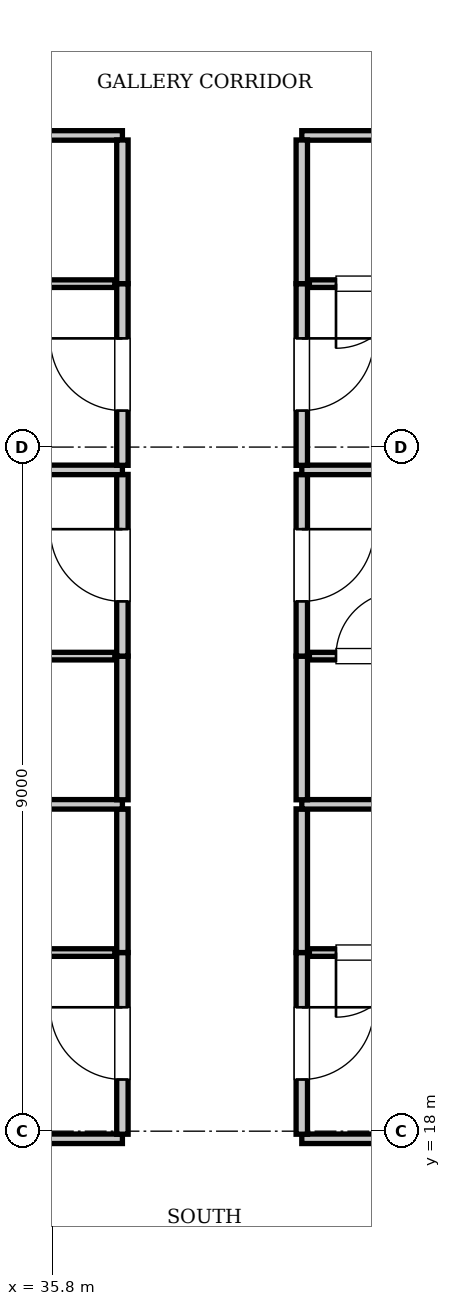
"""IFC4 building model, lengths in metres.
Left out: names, types, materials, properties, quantities, classifications, styles, units other than length and angle.
Written with IfcOpenShell. Run it as: python <this file> out.ifc"""

import sys

from ifc_helpers import new_model, si_unit, direction, frame, frame_2d, origin, place, context, subcontext, project, spatial, rectangle, extrude, element, fill, save


model = new_model("IFC4")
c1 = context("Model", 3, precision=1e-05, world=origin(), true_north=direction((0.0, 1.0)))
c2 = subcontext(c1, "Body", "Model", "MODEL_VIEW")
j1 = project(units=[si_unit("LENGTHUNIT", "METRE"), si_unit("PLANEANGLEUNIT", "RADIAN")], contexts=[c1])
p1 = place(None, origin())
s1 = spatial("IfcSite", under=j1, at=p1, CompositionType="ELEMENT")
p2 = place(p1, origin())
s2 = spatial("IfcBuilding", under=s1, at=p2, CompositionType="ELEMENT")
p3 = place(p2, frame((0.0, 0.0, 212.1)))
s3 = spatial("IfcBuildingStorey", under=s2, at=p3, CompositionType="ELEMENT", Elevation=212.1)
p4 = place(p3, frame((13.2, 17.9, 0.0), z_axis=(0.0, 0.0, 1.0), x_axis=(1.0, 0.0, 0.0)))
e1 = element("IfcWall", 1, at=p4, inside=s3, PredefinedType="PARTITIONING", context=c2, shape_type="SweptSolid", body=[
    extrude(rectangle(XDim=23.52, YDim=0.125, at=frame_2d((11.76, 0.0))), origin(), (0.0, 0.0, 1.0), 3.071),
])
p5 = place(p3, frame((39.08, 17.9, 0.0), z_axis=(0.0, 0.0, 1.0), x_axis=(1.0, 0.0, 0.0)))
e2 = element("IfcWall", 2, at=p5, inside=s3, PredefinedType="PARTITIONING", context=c2, shape_type="SweptSolid", body=[
    extrude(rectangle(XDim=23.32, YDim=0.125, at=frame_2d((11.66, 0.0))), origin(), (0.0, 0.0, 1.0), 3.071),
])
p6 = place(p3, frame((13.2, 31.1, 0.0), z_axis=(0.0, 0.0, 1.0), x_axis=(1.0, 0.0, 0.0)))
e3 = element("IfcWall", 3, at=p6, inside=s3, PredefinedType="PARTITIONING", context=c2, shape_type="SweptSolid", body=[
    extrude(rectangle(XDim=23.52, YDim=0.125, at=frame_2d((11.76, 0.0))), origin(), (0.0, 0.0, 1.0), 3.61),
])
p7 = place(p3, frame((39.08, 31.1, 0.0), z_axis=(0.0, 0.0, 1.0), x_axis=(1.0, 0.0, 0.0)))
e4 = element("IfcWall", 4, at=p7, inside=s3, PredefinedType="PARTITIONING", context=c2, shape_type="SweptSolid", body=[
    extrude(rectangle(XDim=23.32, YDim=0.125, at=frame_2d((11.66, 0.0))), origin(), (0.0, 0.0, 1.0), 3.61),
])
p8 = place(p3, frame((36.72, 17.96, 0.0), z_axis=(0.0, 0.0, 1.0), x_axis=(0.0, 1.0, 0.0)))
e5 = element("IfcWall", 5, at=p8, inside=s3, PredefinedType="PARTITIONING", context=c2, shape_type="SweptSolid", body=[
    extrude(rectangle(XDim=2.39, YDim=0.15, at=frame_2d((1.195, 0.0))), origin(), (0.0, 0.0, 1.0), 3.61),
])
p9 = place(p8, frame((0.72, 0.0, 0.0)))
e6 = element("IfcOpeningElement", 6, at=p9, cuts=e5, PredefinedType="OPENING", context=c2, shape_type="SweptSolid", body=[
    extrude(rectangle(XDim=0.95, YDim=2.15, at=frame_2d((0.475, 1.075))), frame((0.0, 0.085, 0.0), z_axis=(0.0, -1.0, 0.0), x_axis=(1.0, 0.0, 0.0)), (0.0, 0.0, 1.0), 0.17),
])
p10 = place(p3, frame((36.72, 20.35, 0.0), z_axis=(0.0, 0.0, 1.0), x_axis=(0.0, 1.0, 0.0)))
e7 = element("IfcWall", 7, at=p10, inside=s3, PredefinedType="PARTITIONING", context=c2, shape_type="SweptSolid", body=[
    extrude(rectangle(XDim=1.89, YDim=0.15, at=frame_2d((0.945, 0.0))), origin(), (0.0, 0.0, 1.0), 3.61),
])
p11 = place(p3, frame((34.32, 20.35, 0.0), z_axis=(0.0, 0.0, 1.0), x_axis=(1.0, 0.0, 0.0)))
e8 = element("IfcWall", 8, at=p11, inside=s3, PredefinedType="PARTITIONING", context=c2, shape_type="SweptSolid", body=[
    extrude(rectangle(XDim=2.3, YDim=0.1, at=frame_2d((1.15, 0.0))), origin(), (0.0, 0.0, 1.0), 3.61),
])
p12 = place(p11, frame((0.35, 0.0, 0.0)))
e9 = element("IfcOpeningElement", 9, at=p12, cuts=e8, PredefinedType="OPENING", context=c2, shape_type="SweptSolid", body=[
    extrude(rectangle(XDim=0.85, YDim=2.1, at=frame_2d((0.425, 1.05))), frame((0.0, 0.06, 0.0), z_axis=(0.0, -1.0, 0.0), x_axis=(1.0, 0.0, 0.0)), (0.0, 0.0, 1.0), 0.12),
])
p13 = place(p3, frame((39.08, 17.96, 0.0), z_axis=(0.0, 0.0, 1.0), x_axis=(0.0, 1.0, 0.0)))
e10 = element("IfcWall", 10, at=p13, inside=s3, PredefinedType="PARTITIONING", context=c2, shape_type="SweptSolid", body=[
    extrude(rectangle(XDim=2.39, YDim=0.15, at=frame_2d((1.195, 0.0))), origin(), (0.0, 0.0, 1.0), 3.61),
])
p14 = place(p13, frame((0.72, 0.0, 0.0)))
e11 = element("IfcOpeningElement", 11, at=p14, cuts=e10, PredefinedType="OPENING", context=c2, shape_type="SweptSolid", body=[
    extrude(rectangle(XDim=0.95, YDim=2.15, at=frame_2d((0.475, 1.075))), frame((0.0, 0.085, 0.0), z_axis=(0.0, -1.0, 0.0), x_axis=(1.0, 0.0, 0.0)), (0.0, 0.0, 1.0), 0.17),
])
p15 = place(p3, frame((39.08, 20.35, 0.0), z_axis=(0.0, 0.0, 1.0), x_axis=(0.0, 1.0, 0.0)))
e12 = element("IfcWall", 12, at=p15, inside=s3, PredefinedType="PARTITIONING", context=c2, shape_type="SweptSolid", body=[
    extrude(rectangle(XDim=1.89, YDim=0.15, at=frame_2d((0.945, 0.0))), origin(), (0.0, 0.0, 1.0), 3.61),
])
p16 = place(p3, frame((39.18, 20.35, 0.0), z_axis=(0.0, 0.0, 1.0), x_axis=(1.0, 0.0, 0.0)))
e13 = element("IfcWall", 13, at=p16, inside=s3, PredefinedType="PARTITIONING", context=c2, shape_type="SweptSolid", body=[
    extrude(rectangle(XDim=2.3, YDim=0.1, at=frame_2d((1.15, 0.0))), origin(), (0.0, 0.0, 1.0), 3.61),
])
p17 = place(p16, frame((0.35, 0.0, 0.0)))
e14 = element("IfcOpeningElement", 14, at=p17, cuts=e13, PredefinedType="OPENING", context=c2, shape_type="SweptSolid", body=[
    extrude(rectangle(XDim=0.85, YDim=2.1, at=frame_2d((0.425, 1.05))), frame((0.0, 0.06, 0.0), z_axis=(0.0, -1.0, 0.0), x_axis=(1.0, 0.0, 0.0)), (0.0, 0.0, 1.0), 0.12),
])
p18 = place(p3, frame((13.2, 22.3, 0.0), z_axis=(0.0, 0.0, 1.0), x_axis=(1.0, 0.0, 0.0)))
e15 = element("IfcWall", 15, at=p18, inside=s3, PredefinedType="PARTITIONING", context=c2, shape_type="SweptSolid", body=[
    extrude(rectangle(XDim=23.52, YDim=0.125, at=frame_2d((11.76, 0.0))), origin(), (0.0, 0.0, 1.0), 3.61),
])
p19 = place(p3, frame((39.08, 22.3, 0.0), z_axis=(0.0, 0.0, 1.0), x_axis=(1.0, 0.0, 0.0)))
e16 = element("IfcWall", 16, at=p19, inside=s3, PredefinedType="PARTITIONING", context=c2, shape_type="SweptSolid", body=[
    extrude(rectangle(XDim=23.32, YDim=0.125, at=frame_2d((11.66, 0.0))), origin(), (0.0, 0.0, 1.0), 3.61),
])
p20 = place(p3, frame((36.72, 22.36, 0.0), z_axis=(0.0, 0.0, 1.0), x_axis=(0.0, 1.0, 0.0)))
e17 = element("IfcWall", 17, at=p20, inside=s3, PredefinedType="PARTITIONING", context=c2, shape_type="SweptSolid", body=[
    extrude(rectangle(XDim=1.89, YDim=0.15, at=frame_2d((0.945, 0.0))), origin(), (0.0, 0.0, 1.0), 3.61),
])
p21 = place(p3, frame((36.72, 24.25, 0.0), z_axis=(0.0, 0.0, 1.0), x_axis=(0.0, 1.0, 0.0)))
e18 = element("IfcWall", 18, at=p21, inside=s3, PredefinedType="PARTITIONING", context=c2, shape_type="SweptSolid", body=[
    extrude(rectangle(XDim=2.39, YDim=0.15, at=frame_2d((1.195, 0.0))), origin(), (0.0, 0.0, 1.0), 3.61),
])
p22 = place(p21, frame((0.72, 0.0, 0.0)))
e19 = element("IfcOpeningElement", 19, at=p22, cuts=e18, PredefinedType="OPENING", context=c2, shape_type="SweptSolid", body=[
    extrude(rectangle(XDim=0.95, YDim=2.15, at=frame_2d((0.475, 1.075))), frame((0.0, 0.085, 0.0), z_axis=(0.0, -1.0, 0.0), x_axis=(1.0, 0.0, 0.0)), (0.0, 0.0, 1.0), 0.17),
])
p23 = place(p3, frame((34.32, 24.25, 0.0), z_axis=(0.0, 0.0, 1.0), x_axis=(1.0, 0.0, 0.0)))
e20 = element("IfcWall", 20, at=p23, inside=s3, PredefinedType="PARTITIONING", context=c2, shape_type="SweptSolid", body=[
    extrude(rectangle(XDim=2.3, YDim=0.1, at=frame_2d((1.15, 0.0))), origin(), (0.0, 0.0, 1.0), 3.61),
])
p24 = place(p23, frame((0.35, 0.0, 0.0)))
e21 = element("IfcOpeningElement", 21, at=p24, cuts=e20, PredefinedType="OPENING", context=c2, shape_type="SweptSolid", body=[
    extrude(rectangle(XDim=0.85, YDim=2.1, at=frame_2d((0.425, 1.05))), frame((0.0, 0.06, 0.0), z_axis=(0.0, -1.0, 0.0), x_axis=(1.0, 0.0, 0.0)), (0.0, 0.0, 1.0), 0.12),
])
p25 = place(p3, frame((39.08, 22.36, 0.0), z_axis=(0.0, 0.0, 1.0), x_axis=(0.0, 1.0, 0.0)))
e22 = element("IfcWall", 22, at=p25, inside=s3, PredefinedType="PARTITIONING", context=c2, shape_type="SweptSolid", body=[
    extrude(rectangle(XDim=1.89, YDim=0.15, at=frame_2d((0.945, 0.0))), origin(), (0.0, 0.0, 1.0), 3.61),
])
p26 = place(p3, frame((39.08, 24.25, 0.0), z_axis=(0.0, 0.0, 1.0), x_axis=(0.0, 1.0, 0.0)))
e23 = element("IfcWall", 23, at=p26, inside=s3, PredefinedType="PARTITIONING", context=c2, shape_type="SweptSolid", body=[
    extrude(rectangle(XDim=2.39, YDim=0.15, at=frame_2d((1.195, 0.0))), origin(), (0.0, 0.0, 1.0), 3.61),
])
p27 = place(p26, frame((0.72, 0.0, 0.0)))
e24 = element("IfcOpeningElement", 24, at=p27, cuts=e23, PredefinedType="OPENING", context=c2, shape_type="SweptSolid", body=[
    extrude(rectangle(XDim=0.95, YDim=2.15, at=frame_2d((0.475, 1.075))), frame((0.0, 0.085, 0.0), z_axis=(0.0, -1.0, 0.0), x_axis=(1.0, 0.0, 0.0)), (0.0, 0.0, 1.0), 0.17),
])
p28 = place(p3, frame((39.18, 24.25, 0.0), z_axis=(0.0, 0.0, 1.0), x_axis=(1.0, 0.0, 0.0)))
e25 = element("IfcWall", 25, at=p28, inside=s3, PredefinedType="PARTITIONING", context=c2, shape_type="SweptSolid", body=[
    extrude(rectangle(XDim=2.3, YDim=0.1, at=frame_2d((1.15, 0.0))), origin(), (0.0, 0.0, 1.0), 3.61),
])
p29 = place(p28, frame((0.35, 0.0, 0.0)))
e26 = element("IfcOpeningElement", 26, at=p29, cuts=e25, PredefinedType="OPENING", context=c2, shape_type="SweptSolid", body=[
    extrude(rectangle(XDim=0.85, YDim=2.1, at=frame_2d((0.425, 1.05))), frame((0.0, 0.06, 0.0), z_axis=(0.0, -1.0, 0.0), x_axis=(1.0, 0.0, 0.0)), (0.0, 0.0, 1.0), 0.12),
])
p30 = place(p3, frame((13.2, 26.7, 0.0), z_axis=(0.0, 0.0, 1.0), x_axis=(1.0, 0.0, 0.0)))
e27 = element("IfcWall", 27, at=p30, inside=s3, PredefinedType="PARTITIONING", context=c2, shape_type="SweptSolid", body=[
    extrude(rectangle(XDim=23.52, YDim=0.125, at=frame_2d((11.76, 0.0))), origin(), (0.0, 0.0, 1.0), 3.61),
])
p31 = place(p3, frame((39.08, 26.7, 0.0), z_axis=(0.0, 0.0, 1.0), x_axis=(1.0, 0.0, 0.0)))
e28 = element("IfcWall", 28, at=p31, inside=s3, PredefinedType="PARTITIONING", context=c2, shape_type="SweptSolid", body=[
    extrude(rectangle(XDim=23.32, YDim=0.125, at=frame_2d((11.66, 0.0))), origin(), (0.0, 0.0, 1.0), 3.61),
])
p32 = place(p3, frame((36.72, 26.76, 0.0), z_axis=(0.0, 0.0, 1.0), x_axis=(0.0, 1.0, 0.0)))
e29 = element("IfcWall", 29, at=p32, inside=s3, PredefinedType="PARTITIONING", context=c2, shape_type="SweptSolid", body=[
    extrude(rectangle(XDim=2.39, YDim=0.15, at=frame_2d((1.195, 0.0))), origin(), (0.0, 0.0, 1.0), 3.61),
])
p33 = place(p32, frame((0.72, 0.0, 0.0)))
e30 = element("IfcOpeningElement", 30, at=p33, cuts=e29, PredefinedType="OPENING", context=c2, shape_type="SweptSolid", body=[
    extrude(rectangle(XDim=0.95, YDim=2.15, at=frame_2d((0.475, 1.075))), frame((0.0, 0.085, 0.0), z_axis=(0.0, -1.0, 0.0), x_axis=(1.0, 0.0, 0.0)), (0.0, 0.0, 1.0), 0.17),
])
p34 = place(p3, frame((36.72, 29.15, 0.0), z_axis=(0.0, 0.0, 1.0), x_axis=(0.0, 1.0, 0.0)))
e31 = element("IfcWall", 31, at=p34, inside=s3, PredefinedType="PARTITIONING", context=c2, shape_type="SweptSolid", body=[
    extrude(rectangle(XDim=1.89, YDim=0.15, at=frame_2d((0.945, 0.0))), origin(), (0.0, 0.0, 1.0), 3.61),
])
p35 = place(p3, frame((34.32, 29.15, 0.0), z_axis=(0.0, 0.0, 1.0), x_axis=(1.0, 0.0, 0.0)))
e32 = element("IfcWall", 32, at=p35, inside=s3, PredefinedType="PARTITIONING", context=c2, shape_type="SweptSolid", body=[
    extrude(rectangle(XDim=2.3, YDim=0.1, at=frame_2d((1.15, 0.0))), origin(), (0.0, 0.0, 1.0), 3.61),
])
p36 = place(p35, frame((0.35, 0.0, 0.0)))
e33 = element("IfcOpeningElement", 33, at=p36, cuts=e32, PredefinedType="OPENING", context=c2, shape_type="SweptSolid", body=[
    extrude(rectangle(XDim=0.85, YDim=2.1, at=frame_2d((0.425, 1.05))), frame((0.0, 0.06, 0.0), z_axis=(0.0, -1.0, 0.0), x_axis=(1.0, 0.0, 0.0)), (0.0, 0.0, 1.0), 0.12),
])
p37 = place(p3, frame((39.08, 26.76, 0.0), z_axis=(0.0, 0.0, 1.0), x_axis=(0.0, 1.0, 0.0)))
e34 = element("IfcWall", 34, at=p37, inside=s3, PredefinedType="PARTITIONING", context=c2, shape_type="SweptSolid", body=[
    extrude(rectangle(XDim=2.39, YDim=0.15, at=frame_2d((1.195, 0.0))), origin(), (0.0, 0.0, 1.0), 3.61),
])
p38 = place(p37, frame((0.72, 0.0, 0.0)))
e35 = element("IfcOpeningElement", 35, at=p38, cuts=e34, PredefinedType="OPENING", context=c2, shape_type="SweptSolid", body=[
    extrude(rectangle(XDim=0.95, YDim=2.15, at=frame_2d((0.475, 1.075))), frame((0.0, 0.085, 0.0), z_axis=(0.0, -1.0, 0.0), x_axis=(1.0, 0.0, 0.0)), (0.0, 0.0, 1.0), 0.17),
])
p39 = place(p3, frame((39.08, 29.15, 0.0), z_axis=(0.0, 0.0, 1.0), x_axis=(0.0, 1.0, 0.0)))
e36 = element("IfcWall", 36, at=p39, inside=s3, PredefinedType="PARTITIONING", context=c2, shape_type="SweptSolid", body=[
    extrude(rectangle(XDim=1.89, YDim=0.15, at=frame_2d((0.945, 0.0))), origin(), (0.0, 0.0, 1.0), 3.61),
])
p40 = place(p3, frame((39.18, 29.15, 0.0), z_axis=(0.0, 0.0, 1.0), x_axis=(1.0, 0.0, 0.0)))
e37 = element("IfcWall", 37, at=p40, inside=s3, PredefinedType="PARTITIONING", context=c2, shape_type="SweptSolid", body=[
    extrude(rectangle(XDim=2.3, YDim=0.1, at=frame_2d((1.15, 0.0))), origin(), (0.0, 0.0, 1.0), 3.61),
])
p41 = place(p40, frame((0.35, 0.0, 0.0)))
e38 = element("IfcOpeningElement", 38, at=p41, cuts=e37, PredefinedType="OPENING", context=c2, shape_type="SweptSolid", body=[
    extrude(rectangle(XDim=0.85, YDim=2.1, at=frame_2d((0.425, 1.05))), frame((0.0, 0.06, 0.0), z_axis=(0.0, -1.0, 0.0), x_axis=(1.0, 0.0, 0.0)), (0.0, 0.0, 1.0), 0.12),
])
p42 = place(p9, origin())
e39 = element("IfcDoor", 39, at=p42, inside=s3, OperationType="SINGLE_SWING_RIGHT", PredefinedType="DOOR", context=c2, shape_type="SweptSolid", body=[
    extrude(rectangle(XDim=0.95, YDim=2.15, at=frame_2d((0.475, 1.075))), frame((0.0, 0.025, 0.0), z_axis=(0.0, -1.0, 0.0), x_axis=(1.0, 0.0, 0.0)), (0.0, 0.0, 1.0), 0.05),
])
fill(e6, e39)
p43 = place(p17, frame((0.85, 0.0, 0.0), z_axis=(0.0, 0.0, 1.0), x_axis=(-1.0, 0.0, 0.0)))
e40 = element("IfcDoor", 40, at=p43, inside=s3, OperationType="SINGLE_SWING_RIGHT", PredefinedType="DOOR", context=c2, shape_type="SweptSolid", body=[
    extrude(rectangle(XDim=0.85, YDim=2.1, at=frame_2d((0.425, 1.05))), frame((0.0, 0.025, 0.0), z_axis=(0.0, -1.0, 0.0), x_axis=(1.0, 0.0, 0.0)), (0.0, 0.0, 1.0), 0.05),
])
fill(e14, e40)
p44 = place(p14, frame((0.95, 0.0, 0.0), z_axis=(0.0, 0.0, 1.0), x_axis=(-1.0, 0.0, 0.0)))
e41 = element("IfcDoor", 41, at=p44, inside=s3, OperationType="SINGLE_SWING_LEFT", PredefinedType="DOOR", context=c2, shape_type="SweptSolid", body=[
    extrude(rectangle(XDim=0.95, YDim=2.15, at=frame_2d((0.475, 1.075))), frame((0.0, 0.025, 0.0), z_axis=(0.0, -1.0, 0.0), x_axis=(1.0, 0.0, 0.0)), (0.0, 0.0, 1.0), 0.05),
])
fill(e11, e41)
p45 = place(p22, origin())
e42 = element("IfcDoor", 42, at=p45, inside=s3, OperationType="SINGLE_SWING_RIGHT", PredefinedType="DOOR", context=c2, shape_type="SweptSolid", body=[
    extrude(rectangle(XDim=0.95, YDim=2.15, at=frame_2d((0.475, 1.075))), frame((0.0, 0.025, 0.0), z_axis=(0.0, -1.0, 0.0), x_axis=(1.0, 0.0, 0.0)), (0.0, 0.0, 1.0), 0.05),
])
fill(e19, e42)
p46 = place(p29, origin())
e43 = element("IfcDoor", 43, at=p46, inside=s3, OperationType="SINGLE_SWING_RIGHT", PredefinedType="DOOR", context=c2, shape_type="SweptSolid", body=[
    extrude(rectangle(XDim=0.85, YDim=2.1, at=frame_2d((0.425, 1.05))), frame((0.0, 0.025, 0.0), z_axis=(0.0, -1.0, 0.0), x_axis=(1.0, 0.0, 0.0)), (0.0, 0.0, 1.0), 0.05),
])
fill(e26, e43)
p47 = place(p27, frame((0.95, 0.0, 0.0), z_axis=(0.0, 0.0, 1.0), x_axis=(-1.0, 0.0, 0.0)))
e44 = element("IfcDoor", 44, at=p47, inside=s3, OperationType="SINGLE_SWING_LEFT", PredefinedType="DOOR", context=c2, shape_type="SweptSolid", body=[
    extrude(rectangle(XDim=0.95, YDim=2.15, at=frame_2d((0.475, 1.075))), frame((0.0, 0.025, 0.0), z_axis=(0.0, -1.0, 0.0), x_axis=(1.0, 0.0, 0.0)), (0.0, 0.0, 1.0), 0.05),
])
fill(e24, e44)
p48 = place(p33, origin())
e45 = element("IfcDoor", 45, at=p48, inside=s3, OperationType="SINGLE_SWING_RIGHT", PredefinedType="DOOR", context=c2, shape_type="SweptSolid", body=[
    extrude(rectangle(XDim=0.95, YDim=2.15, at=frame_2d((0.475, 1.075))), frame((0.0, 0.025, 0.0), z_axis=(0.0, -1.0, 0.0), x_axis=(1.0, 0.0, 0.0)), (0.0, 0.0, 1.0), 0.05),
])
fill(e30, e45)
p49 = place(p41, frame((0.85, 0.0, 0.0), z_axis=(0.0, 0.0, 1.0), x_axis=(-1.0, 0.0, 0.0)))
e46 = element("IfcDoor", 46, at=p49, inside=s3, OperationType="SINGLE_SWING_RIGHT", PredefinedType="DOOR", context=c2, shape_type="SweptSolid", body=[
    extrude(rectangle(XDim=0.85, YDim=2.1, at=frame_2d((0.425, 1.05))), frame((0.0, 0.025, 0.0), z_axis=(0.0, -1.0, 0.0), x_axis=(1.0, 0.0, 0.0)), (0.0, 0.0, 1.0), 0.05),
])
fill(e38, e46)
p50 = place(p38, frame((0.95, 0.0, 0.0), z_axis=(0.0, 0.0, 1.0), x_axis=(-1.0, 0.0, 0.0)))
e47 = element("IfcDoor", 47, at=p50, inside=s3, OperationType="SINGLE_SWING_LEFT", PredefinedType="DOOR", context=c2, shape_type="SweptSolid", body=[
    extrude(rectangle(XDim=0.95, YDim=2.15, at=frame_2d((0.475, 1.075))), frame((0.0, 0.025, 0.0), z_axis=(0.0, -1.0, 0.0), x_axis=(1.0, 0.0, 0.0)), (0.0, 0.0, 1.0), 0.05),
])
fill(e35, e47)
save(model, sys.argv[1])
